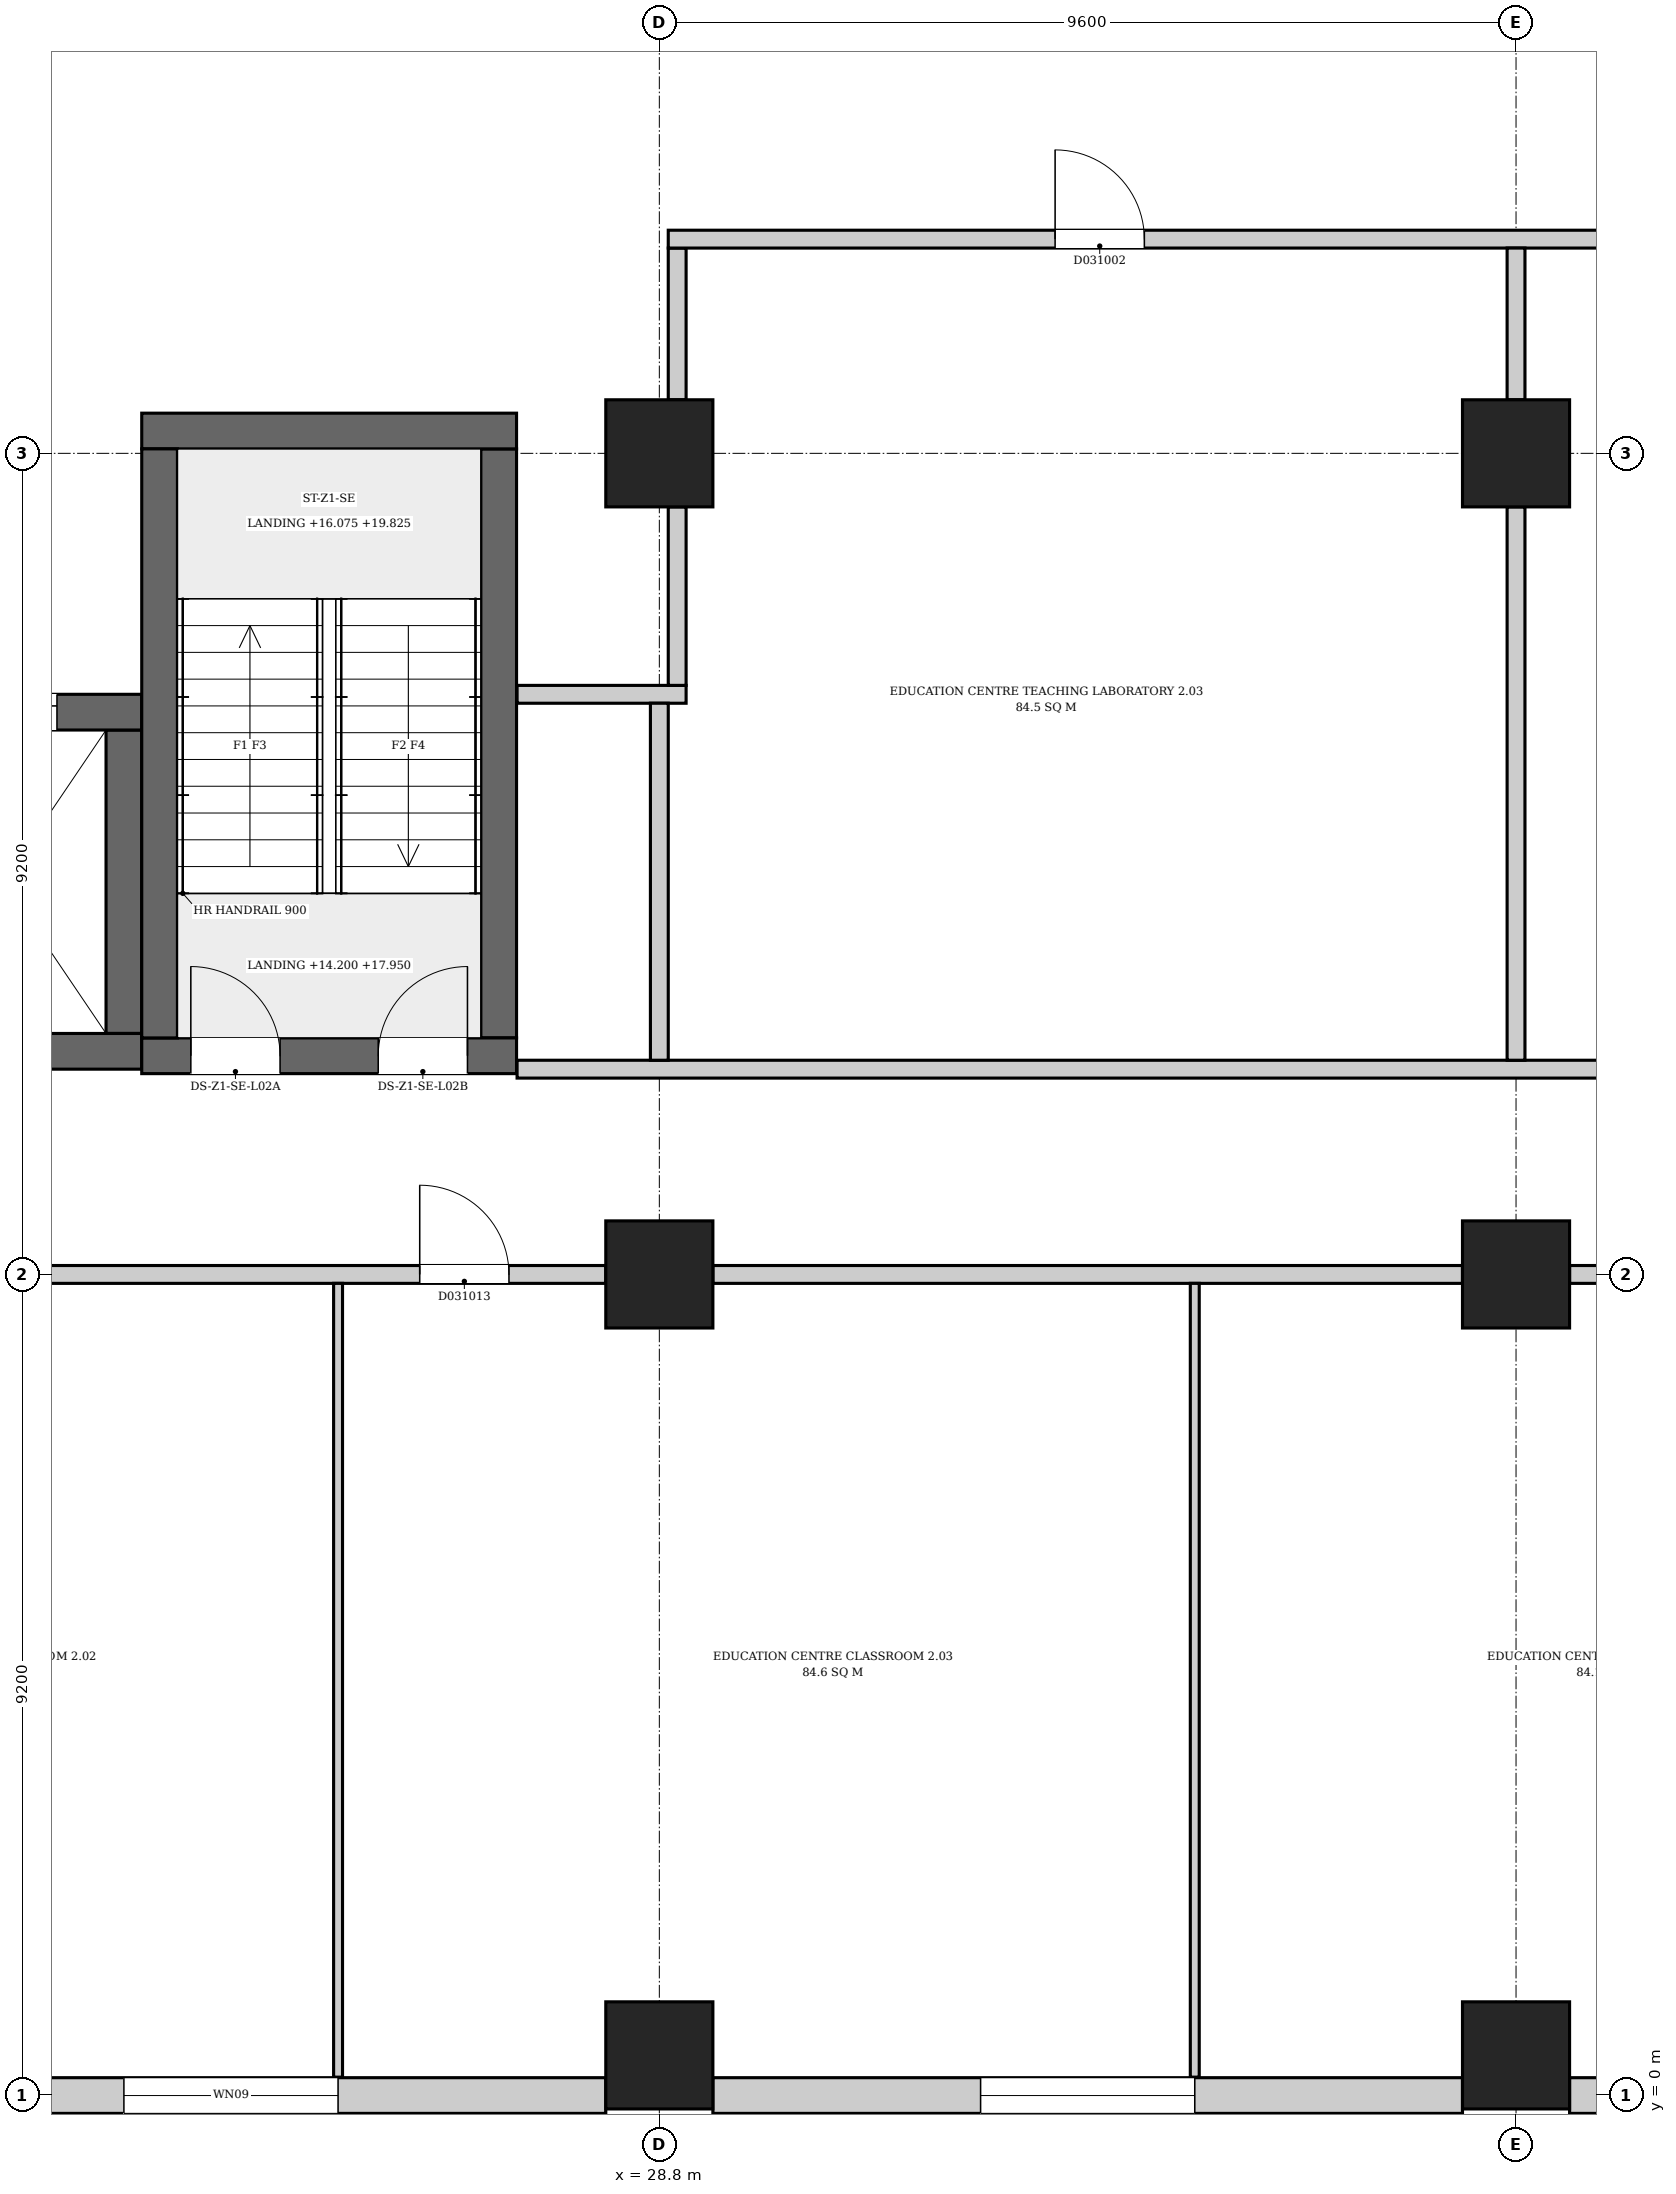
"""IFC4 building model, lengths in metres.
Left out: names, types, materials, properties, quantities, classifications, styles, units other than length and angle.
Written with IfcOpenShell. Run it as: python <this file> out.ifc"""

import sys

from ifc_helpers import new_model, si_unit, direction, frame, frame_2d, origin, origin_2d, place, context, subcontext, project, spatial, rectangle, extrude, element, fill, save


model = new_model("IFC4")
c1 = context("Model", 3, precision=1e-05, world=origin(), true_north=direction((0.0, 1.0)))
c2 = subcontext(c1, "Body", "Model", "MODEL_VIEW")
j1 = project(units=[si_unit("LENGTHUNIT", "METRE"), si_unit("PLANEANGLEUNIT", "RADIAN")], contexts=[c1])
p1 = place(None, origin())
s1 = spatial("IfcSite", under=j1, at=p1, CompositionType="ELEMENT")
p2 = place(p1, origin())
s2 = spatial("IfcBuilding", under=s1, at=p2, CompositionType="ELEMENT")
p3 = place(p2, frame((0.0, 0.0, 14.2)))
s3 = spatial("IfcBuildingStorey", under=s2, at=p3, CompositionType="ELEMENT", Elevation=14.2)
p4 = place(p3, frame((23.0, 11.65, 0.0), z_axis=(0.0, 0.0, 1.0), x_axis=(1.0, 0.0, 0.0)))
e1 = element("IfcWall", 1, at=p4, inside=s3, PredefinedType="SHEAR", context=c2, shape_type="SweptSolid", body=[
    extrude(rectangle(XDim=4.2, YDim=0.4, at=frame_2d((2.1, 0.0))), origin(), (0.0, 0.0, 1.0), 7.5),
])
p5 = place(p4, frame((0.55, 0.0, 0.0)))
e2 = element("IfcOpeningElement", 2, at=p5, cuts=e1, PredefinedType="OPENING", context=c2, shape_type="SweptSolid", body=[
    extrude(rectangle(XDim=1.0, YDim=2.1, at=frame_2d((0.5, 1.05))), frame((0.0, 0.21, 0.0), z_axis=(0.0, -1.0, 0.0), x_axis=(1.0, 0.0, 0.0)), (0.0, 0.0, 1.0), 0.42),
])
p6 = place(p4, frame((2.65, 0.0, 0.0)))
e3 = element("IfcOpeningElement", 3, at=p6, cuts=e1, PredefinedType="OPENING", context=c2, shape_type="SweptSolid", body=[
    extrude(rectangle(XDim=1.0, YDim=2.1, at=frame_2d((0.5, 1.05))), frame((0.0, 0.21, 0.0), z_axis=(0.0, -1.0, 0.0), x_axis=(1.0, 0.0, 0.0)), (0.0, 0.0, 1.0), 0.42),
])
p7 = place(p3, frame((23.0, 18.65, 0.0), z_axis=(0.0, 0.0, 1.0), x_axis=(1.0, 0.0, 0.0)))
e4 = element("IfcWall", 4, at=p7, inside=s3, PredefinedType="SHEAR", context=c2, shape_type="SweptSolid", body=[
    extrude(rectangle(XDim=4.2, YDim=0.4, at=frame_2d((2.1, 0.0))), origin(), (0.0, 0.0, 1.0), 7.5),
])
for number, where, z_axis, x_axis in (
    (5, (23.2, 11.85, 0.0), (0.0, 0.0, 1.0), (0.0, 1.0, 0.0)),
    (6, (27.0, 11.85, 0.0), (0.0, 0.0, 1.0), (0.0, 1.0, 0.0)),
):
    element("IfcWall", number, at=place(p3, frame(where, z_axis=z_axis, x_axis=x_axis)), inside=s3, PredefinedType="SHEAR", context=c2, shape_type="SweptSolid", body=[
        extrude(rectangle(XDim=6.6, YDim=0.4, at=frame_2d((3.3, 0.0))), origin(), (0.0, 0.0, 1.0), 7.5),
    ])
p8 = place(p3, frame((19.9, 11.7, 0.0), z_axis=(0.0, 0.0, 1.0), x_axis=(1.0, 0.0, 0.0)))
e7 = element("IfcWall", 7, at=p8, inside=s3, PredefinedType="SHEAR", context=c2, shape_type="SweptSolid", body=[
    extrude(rectangle(XDim=3.1, YDim=0.4, at=frame_2d((1.55, 0.0))), origin(), (0.0, 0.0, 1.0), 7.5),
])
p9 = place(p3, frame((19.9, 15.5, 0.0), z_axis=(0.0, 0.0, 1.0), x_axis=(1.0, 0.0, 0.0)))
e8 = element("IfcWall", 8, at=p9, inside=s3, PredefinedType="SHEAR", context=c2, shape_type="SweptSolid", body=[
    extrude(rectangle(XDim=3.1, YDim=0.4, at=frame_2d((1.55, 0.0))), origin(), (0.0, 0.0, 1.0), 7.5),
])
p10 = place(p9, frame((0.95, 0.0, 0.0)))
e9 = element("IfcOpeningElement", 9, at=p10, cuts=e8, PredefinedType="OPENING", context=c2, shape_type="SweptSolid", body=[
    extrude(rectangle(XDim=1.2, YDim=2.1, at=frame_2d((0.6, 1.05))), frame((0.0, 0.21, 0.0), z_axis=(0.0, -1.0, 0.0), x_axis=(1.0, 0.0, 0.0)), (0.0, 0.0, 1.0), 0.42),
])
p11 = place(p3, frame((22.8, 11.9, 0.0), z_axis=(0.0, 0.0, 1.0), x_axis=(0.0, 1.0, 0.0)))
e10 = element("IfcWall", 10, at=p11, inside=s3, PredefinedType="SHEAR", context=c2, shape_type="SweptSolid", body=[
    extrude(rectangle(XDim=3.4, YDim=0.4, at=frame_2d((1.7, 0.0))), origin(), (0.0, 0.0, 1.0), 7.5),
])
for number, where, z_axis, x_axis in (
    (11, (28.8, 0.45, 0.0), (0.0, 0.0, 1.0), (1.0, 0.0, 0.0)),
    (12, (38.4, 0.45, 0.0), (0.0, 0.0, 1.0), (1.0, 0.0, 0.0)),
    (13, (28.8, 9.2, 0.0), (0.0, 0.0, 1.0), (1.0, 0.0, 0.0)),
    (14, (38.4, 9.2, 0.0), (0.0, 0.0, 1.0), (1.0, 0.0, 0.0)),
    (15, (28.8, 18.4, 0.0), (0.0, 0.0, 1.0), (1.0, 0.0, 0.0)),
    (16, (38.4, 18.4, 0.0), (0.0, 0.0, 1.0), (1.0, 0.0, 0.0)),
):
    element("IfcColumn", number, at=place(p3, frame(where, z_axis=z_axis, x_axis=x_axis)), inside=s3, PredefinedType="COLUMN", context=c2, shape_type="SweptSolid", body=[
        extrude(rectangle(XDim=1.2, YDim=1.2, at=origin_2d()), origin(), (0.0, 0.0, 1.0), 7.5),
    ])
p12 = place(p3, frame((19.8, 0.0, 0.0), z_axis=(0.0, 0.0, 1.0), x_axis=(1.0, 0.0, 0.0)))
e17 = element("IfcWall", 17, at=p12, inside=s3, PredefinedType="ELEMENTEDWALL", context=c2, shape_type="SweptSolid", body=[
    extrude(rectangle(XDim=8.4, YDim=0.4, at=frame_2d((4.2, 0.0))), origin(), (0.0, 0.0, 1.0), 7.15),
])
p13 = place(p12, frame((3.0, 0.0, 1.0)))
e18 = element("IfcOpeningElement", 18, at=p13, cuts=e17, PredefinedType="OPENING", context=c2, shape_type="SweptSolid", body=[
    extrude(rectangle(XDim=2.4, YDim=2.2, at=frame_2d((1.2, 1.1))), frame((0.0, 0.21, 0.0), z_axis=(0.0, -1.0, 0.0), x_axis=(1.0, 0.0, 0.0)), (0.0, 0.0, 1.0), 0.42),
])
p14 = place(p3, frame((29.4, 0.0, 0.0), z_axis=(0.0, 0.0, 1.0), x_axis=(1.0, 0.0, 0.0)))
e19 = element("IfcWall", 19, at=p14, inside=s3, PredefinedType="ELEMENTEDWALL", context=c2, shape_type="SweptSolid", body=[
    extrude(rectangle(XDim=8.4, YDim=0.4, at=frame_2d((4.2, 0.0))), origin(), (0.0, 0.0, 1.0), 7.15),
])
p15 = place(p14, frame((3.0, 0.0, 1.0)))
e20 = element("IfcOpeningElement", 20, at=p15, cuts=e19, PredefinedType="OPENING", context=c2, shape_type="SweptSolid", body=[
    extrude(rectangle(XDim=2.4, YDim=2.2, at=frame_2d((1.2, 1.1))), frame((0.0, 0.21, 0.0), z_axis=(0.0, -1.0, 0.0), x_axis=(1.0, 0.0, 0.0)), (0.0, 0.0, 1.0), 0.42),
])
p16 = place(p3, frame((39.0, 0.0, 0.0), z_axis=(0.0, 0.0, 1.0), x_axis=(1.0, 0.0, 0.0)))
e21 = element("IfcWall", 21, at=p16, inside=s3, PredefinedType="ELEMENTEDWALL", context=c2, shape_type="SweptSolid", body=[
    extrude(rectangle(XDim=8.4, YDim=0.4, at=frame_2d((4.2, 0.0))), origin(), (0.0, 0.0, 1.0), 7.15),
])
p17 = place(p16, frame((3.0, 0.0, 1.0)))
e22 = element("IfcOpeningElement", 22, at=p17, cuts=e21, PredefinedType="OPENING", context=c2, shape_type="SweptSolid", body=[
    extrude(rectangle(XDim=2.4, YDim=2.2, at=frame_2d((1.2, 1.1))), frame((0.0, 0.21, 0.0), z_axis=(0.0, -1.0, 0.0), x_axis=(1.0, 0.0, 0.0)), (0.0, 0.0, 1.0), 0.42),
])
p18 = place(p3, frame((19.8, 9.2, 0.0), z_axis=(0.0, 0.0, 1.0), x_axis=(1.0, 0.0, 0.0)))
e23 = element("IfcWall", 23, at=p18, inside=s3, PredefinedType="PARTITIONING", context=c2, shape_type="SweptSolid", body=[
    extrude(rectangle(XDim=8.4, YDim=0.2, at=frame_2d((4.2, 0.0))), origin(), (0.0, 0.0, 1.0), 6.75),
])
p19 = place(p18, frame((6.315, 0.0, 0.0)))
e24 = element("IfcOpeningElement", 24, at=p19, cuts=e23, PredefinedType="OPENING", context=c2, shape_type="SweptSolid", body=[
    extrude(rectangle(XDim=1.0, YDim=2.1, at=frame_2d((0.5, 1.05))), frame((0.0, 0.11, 0.0), z_axis=(0.0, -1.0, 0.0), x_axis=(1.0, 0.0, 0.0)), (0.0, 0.0, 1.0), 0.22),
])
p20 = place(p3, frame((25.2, 0.206, 0.0), z_axis=(0.0, 0.0, 1.0), x_axis=(0.0, 1.0, 0.0)))
e25 = element("IfcWall", 25, at=p20, inside=s3, PredefinedType="PARTITIONING", context=c2, shape_type="SweptSolid", body=[
    extrude(rectangle(XDim=8.894, YDim=0.1, at=frame_2d((4.447, 0.0))), origin(), (0.0, 0.0, 1.0), 7.15),
])
p21 = place(p3, frame((27.206, 11.5, 0.0), z_axis=(0.0, 0.0, 1.0), x_axis=(1.0, 0.0, 0.0)))
e26 = element("IfcWall", 26, at=p21, inside=s3, PredefinedType="PARTITIONING", context=c2, shape_type="SweptSolid", body=[
    extrude(rectangle(XDim=26.494, YDim=0.2, at=frame_2d((13.247, 0.0))), origin(), (0.0, 0.0, 1.0), 7.15),
])
p22 = place(p3, frame((27.206, 15.7, 0.0), z_axis=(0.0, 0.0, 1.0), x_axis=(1.0, 0.0, 0.0)))
e27 = element("IfcWall", 27, at=p22, inside=s3, PredefinedType="PARTITIONING", context=c2, shape_type="SweptSolid", body=[
    extrude(rectangle(XDim=1.894, YDim=0.2, at=frame_2d((0.947, 0.0))), origin(), (0.0, 0.0, 1.0), 7.15),
])
p23 = place(p3, frame((28.8, 11.6, 0.0), z_axis=(0.0, 0.0, 1.0), x_axis=(0.0, 1.0, 0.0)))
e28 = element("IfcWall", 28, at=p23, inside=s3, PredefinedType="PARTITIONING", context=c2, shape_type="SweptSolid", body=[
    extrude(rectangle(XDim=4.0, YDim=0.2, at=frame_2d((2.0, 0.0))), origin(), (0.0, 0.0, 1.0), 6.75),
])
p24 = place(p3, frame((29.0, 15.8, 0.0), z_axis=(0.0, 0.0, 1.0), x_axis=(0.0, 1.0, 0.0)))
e29 = element("IfcWall", 29, at=p24, inside=s3, PredefinedType="PARTITIONING", context=c2, shape_type="SweptSolid", body=[
    extrude(rectangle(XDim=2.0, YDim=0.2, at=frame_2d((1.0, 0.0))), origin(), (0.0, 0.0, 1.0), 6.75),
])
p25 = place(p3, frame((29.0, 19.0, 0.0), z_axis=(0.0, 0.0, 1.0), x_axis=(0.0, 1.0, 0.0)))
e30 = element("IfcWall", 30, at=p25, inside=s3, PredefinedType="PARTITIONING", context=c2, shape_type="SweptSolid", body=[
    extrude(rectangle(XDim=1.7, YDim=0.2, at=frame_2d((0.85, 0.0))), origin(), (0.0, 0.0, 1.0), 6.75),
])
p26 = place(p3, frame((28.9, 20.8, 0.0), z_axis=(0.0, 0.0, 1.0), x_axis=(1.0, 0.0, 0.0)))
e31 = element("IfcWall", 31, at=p26, inside=s3, PredefinedType="PARTITIONING", context=c2, shape_type="SweptSolid", body=[
    extrude(rectangle(XDim=28.494, YDim=0.2, at=frame_2d((14.247, 0.0))), origin(), (0.0, 0.0, 1.0), 7.15),
])
p27 = place(p26, frame((4.335, 0.0, 0.0)))
e32 = element("IfcOpeningElement", 32, at=p27, cuts=e31, PredefinedType="OPENING", context=c2, shape_type="SweptSolid", body=[
    extrude(rectangle(XDim=1.0, YDim=2.1, at=frame_2d((0.5, 1.05))), frame((0.0, 0.11, 0.0), z_axis=(0.0, -1.0, 0.0), x_axis=(1.0, 0.0, 0.0)), (0.0, 0.0, 1.0), 0.22),
])
p28 = place(p26, frame((13.8, 0.0, 0.0)))
e33 = element("IfcOpeningElement", 33, at=p28, cuts=e31, PredefinedType="OPENING", context=c2, shape_type="SweptSolid", body=[
    extrude(rectangle(XDim=1.0, YDim=2.1, at=frame_2d((0.5, 1.05))), frame((0.0, 0.11, 0.0), z_axis=(0.0, -1.0, 0.0), x_axis=(1.0, 0.0, 0.0)), (0.0, 0.0, 1.0), 0.22),
])
p29 = place(p26, frame((21.95, 0.0, 0.0)))
e34 = element("IfcOpeningElement", 34, at=p29, cuts=e31, PredefinedType="OPENING", context=c2, shape_type="SweptSolid", body=[
    extrude(rectangle(XDim=1.0, YDim=2.1, at=frame_2d((0.5, 1.05))), frame((0.0, 0.11, 0.0), z_axis=(0.0, -1.0, 0.0), x_axis=(1.0, 0.0, 0.0)), (0.0, 0.0, 1.0), 0.22),
])
p30 = place(p3, frame((29.4, 9.2, 0.0), z_axis=(0.0, 0.0, 1.0), x_axis=(1.0, 0.0, 0.0)))
e35 = element("IfcWall", 35, at=p30, inside=s3, PredefinedType="PARTITIONING", context=c2, shape_type="SweptSolid", body=[
    extrude(rectangle(XDim=8.4, YDim=0.2, at=frame_2d((4.2, 0.0))), origin(), (0.0, 0.0, 1.0), 6.75),
])
p31 = place(p3, frame((34.8, 0.206, 0.0), z_axis=(0.0, 0.0, 1.0), x_axis=(0.0, 1.0, 0.0)))
e36 = element("IfcWall", 36, at=p31, inside=s3, PredefinedType="PARTITIONING", context=c2, shape_type="SweptSolid", body=[
    extrude(rectangle(XDim=8.894, YDim=0.1, at=frame_2d((4.447, 0.0))), origin(), (0.0, 0.0, 1.0), 7.15),
])
p32 = place(p3, frame((38.4, 11.6, 0.0), z_axis=(0.0, 0.0, 1.0), x_axis=(0.0, 1.0, 0.0)))
e37 = element("IfcWall", 37, at=p32, inside=s3, PredefinedType="PARTITIONING", context=c2, shape_type="SweptSolid", body=[
    extrude(rectangle(XDim=6.2, YDim=0.2, at=frame_2d((3.1, 0.0))), origin(), (0.0, 0.0, 1.0), 6.75),
])
p33 = place(p3, frame((38.4, 19.0, 0.0), z_axis=(0.0, 0.0, 1.0), x_axis=(0.0, 1.0, 0.0)))
e38 = element("IfcWall", 38, at=p33, inside=s3, PredefinedType="PARTITIONING", context=c2, shape_type="SweptSolid", body=[
    extrude(rectangle(XDim=1.7, YDim=0.2, at=frame_2d((0.85, 0.0))), origin(), (0.0, 0.0, 1.0), 6.75),
])
p34 = place(p3, frame((39.0, 9.2, 0.0), z_axis=(0.0, 0.0, 1.0), x_axis=(1.0, 0.0, 0.0)))
e39 = element("IfcWall", 39, at=p34, inside=s3, PredefinedType="PARTITIONING", context=c2, shape_type="SweptSolid", body=[
    extrude(rectangle(XDim=8.4, YDim=0.2, at=frame_2d((4.2, 0.0))), origin(), (0.0, 0.0, 1.0), 6.75),
])
p35 = place(p34, frame((2.285, 0.0, 0.0)))
e40 = element("IfcOpeningElement", 40, at=p35, cuts=e39, PredefinedType="OPENING", context=c2, shape_type="SweptSolid", body=[
    extrude(rectangle(XDim=1.0, YDim=2.1, at=frame_2d((0.5, 1.05))), frame((0.0, 0.11, 0.0), z_axis=(0.0, -1.0, 0.0), x_axis=(1.0, 0.0, 0.0)), (0.0, 0.0, 1.0), 0.22),
])
p36 = place(p34, frame((6.315, 0.0, 0.0)))
e41 = element("IfcOpeningElement", 41, at=p36, cuts=e39, PredefinedType="OPENING", context=c2, shape_type="SweptSolid", body=[
    extrude(rectangle(XDim=1.0, YDim=2.1, at=frame_2d((0.5, 1.05))), frame((0.0, 0.11, 0.0), z_axis=(0.0, -1.0, 0.0), x_axis=(1.0, 0.0, 0.0)), (0.0, 0.0, 1.0), 0.22),
])
p37 = place(p13, origin())
e42 = element("IfcWindow", 42, at=p37, inside=s3, PartitioningType="SINGLE_PANEL", PredefinedType="WINDOW", context=c2, shape_type="SweptSolid", body=[
    extrude(rectangle(XDim=2.4, YDim=2.2, at=frame_2d((1.2, 1.1))), frame((0.0, 0.03, 0.0), z_axis=(0.0, -1.0, 0.0), x_axis=(1.0, 0.0, 0.0)), (0.0, 0.0, 1.0), 0.06),
])
fill(e18, e42)
p38 = place(p15, origin())
e43 = element("IfcWindow", 43, at=p38, inside=s3, PartitioningType="SINGLE_PANEL", PredefinedType="WINDOW", context=c2, shape_type="SweptSolid", body=[
    extrude(rectangle(XDim=2.4, YDim=2.2, at=frame_2d((1.2, 1.1))), frame((0.0, 0.03, 0.0), z_axis=(0.0, -1.0, 0.0), x_axis=(1.0, 0.0, 0.0)), (0.0, 0.0, 1.0), 0.06),
])
fill(e20, e43)
p39 = place(p5, origin())
e44 = element("IfcDoor", 44, at=p39, inside=s3, OperationType="SINGLE_SWING_RIGHT", PredefinedType="DOOR", context=c2, shape_type="SweptSolid", body=[
    extrude(rectangle(XDim=1.0, YDim=2.1, at=frame_2d((0.5, 1.05))), frame((0.0, 0.025, 0.0), z_axis=(0.0, -1.0, 0.0), x_axis=(1.0, 0.0, 0.0)), (0.0, 0.0, 1.0), 0.05),
])
fill(e2, e44)
p40 = place(p6, origin())
e45 = element("IfcDoor", 45, at=p40, inside=s3, OperationType="SINGLE_SWING_LEFT", PredefinedType="DOOR", context=c2, shape_type="SweptSolid", body=[
    extrude(rectangle(XDim=1.0, YDim=2.1, at=frame_2d((0.5, 1.05))), frame((0.0, 0.025, 0.0), z_axis=(0.0, -1.0, 0.0), x_axis=(1.0, 0.0, 0.0)), (0.0, 0.0, 1.0), 0.05),
])
fill(e3, e45)
p41 = place(p10, origin())
e46 = element("IfcDoor", 46, at=p41, inside=s3, OperationType="DOUBLE_DOOR_SLIDING", PredefinedType="DOOR", context=c2, shape_type="SweptSolid", body=[
    extrude(rectangle(XDim=1.2, YDim=2.1, at=frame_2d((0.6, 1.05))), frame((0.0, 0.025, 0.0), z_axis=(0.0, -1.0, 0.0), x_axis=(1.0, 0.0, 0.0)), (0.0, 0.0, 1.0), 0.05),
])
fill(e9, e46)
p42 = place(p27, origin())
e47 = element("IfcDoor", 47, at=p42, inside=s3, OperationType="SINGLE_SWING_LEFT", PredefinedType="DOOR", context=c2, shape_type="SweptSolid", body=[
    extrude(rectangle(XDim=1.0, YDim=2.1, at=frame_2d((0.5, 1.05))), frame((0.0, 0.025, 0.0), z_axis=(0.0, -1.0, 0.0), x_axis=(1.0, 0.0, 0.0)), (0.0, 0.0, 1.0), 0.05),
])
fill(e32, e47)
p43 = place(p19, origin())
e48 = element("IfcDoor", 48, at=p43, inside=s3, OperationType="SINGLE_SWING_LEFT", PredefinedType="DOOR", context=c2, shape_type="SweptSolid", body=[
    extrude(rectangle(XDim=1.0, YDim=2.1, at=frame_2d((0.5, 1.05))), frame((0.0, 0.025, 0.0), z_axis=(0.0, -1.0, 0.0), x_axis=(1.0, 0.0, 0.0)), (0.0, 0.0, 1.0), 0.05),
])
fill(e24, e48)
save(model, sys.argv[1])
